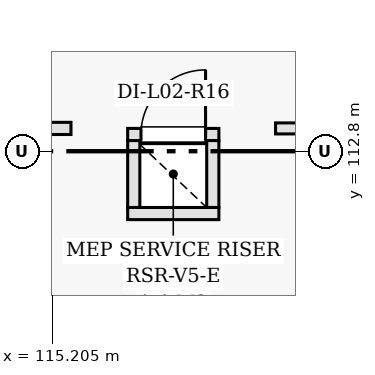
"""IFC4 building model, lengths in metres.
Left out: names, types, materials, properties, quantities, classifications, styles, units other than length and angle.
Written with IfcOpenShell. Run it as: python <this file> out.ifc"""

import sys

from ifc_helpers import new_model, si_unit, direction, frame, frame_2d, origin, place, context, subcontext, project, spatial, rectangle, extrude, element, fill, save


model = new_model("IFC4")
c1 = context("Model", 3, precision=1e-05, world=origin(), true_north=direction((0.0, 1.0)))
c2 = subcontext(c1, "Body", "Model", "MODEL_VIEW")
j1 = project(units=[si_unit("LENGTHUNIT", "METRE"), si_unit("PLANEANGLEUNIT", "RADIAN")], contexts=[c1])
p1 = place(None, origin())
s1 = spatial("IfcSite", under=j1, at=p1, CompositionType="ELEMENT")
p2 = place(p1, origin())
s2 = spatial("IfcBuilding", under=s1, at=p2, CompositionType="ELEMENT")
p3 = place(p2, frame((0.0, 0.0, 9.6)))
s3 = spatial("IfcBuildingStorey", under=s2, at=p3, CompositionType="ELEMENT", Elevation=9.6)
p4 = place(p3, frame((116.2, 111.98, 0.0), z_axis=(0.0, 0.0, 1.0), x_axis=(1.0, 0.0, 0.0)))
e1 = element("IfcWall", 1, at=p4, inside=s3, PredefinedType="PARTITIONING", context=c2, shape_type="SweptSolid", body=[
    extrude(rectangle(XDim=1.2, YDim=0.16, at=frame_2d((0.6, 0.0))), origin(), (0.0, 0.0, 1.0), 3.94),
])
p5 = place(p3, frame((116.2, 113.02, 0.0), z_axis=(0.0, 0.0, 1.0), x_axis=(1.0, 0.0, 0.0)))
e2 = element("IfcWall", 2, at=p5, inside=s3, PredefinedType="PARTITIONING", context=c2, shape_type="SweptSolid", body=[
    extrude(rectangle(XDim=1.2, YDim=0.16, at=frame_2d((0.6, 0.0))), origin(), (0.0, 0.0, 1.0), 3.94),
])
p6 = place(p5, frame((0.175, 0.0, 0.0)))
e3 = element("IfcOpeningElement", 3, at=p6, cuts=e2, PredefinedType="OPENING", context=c2, shape_type="SweptSolid", body=[
    extrude(rectangle(XDim=0.85, YDim=2.02, at=frame_2d((0.425, 1.01))), frame((0.0, 0.09, 0.0), z_axis=(0.0, -1.0, 0.0), x_axis=(1.0, 0.0, 0.0)), (0.0, 0.0, 1.0), 0.18),
])
for number, where, z_axis, x_axis in (
    (4, (116.28, 112.06, 0.0), (0.0, 0.0, 1.0), (0.0, 1.0, 0.0)),
    (5, (117.32, 112.06, 0.0), (0.0, 0.0, 1.0), (0.0, 1.0, 0.0)),
):
    element("IfcWall", number, at=place(p3, frame(where, z_axis=z_axis, x_axis=x_axis)), inside=s3, PredefinedType="PARTITIONING", context=c2, shape_type="SweptSolid", body=[
        extrude(rectangle(XDim=0.88, YDim=0.16, at=frame_2d((0.44, 0.0))), origin(), (0.0, 0.0, 1.0), 3.94),
    ])
p7 = place(p3, frame((102.487, 113.1, 0.0), z_axis=(0.0, 0.0, 1.0), x_axis=(1.0, 0.0, 0.0)))
e6 = element("IfcWall", 6, at=p7, inside=s3, PredefinedType="PARTITIONING", context=c2, shape_type="SweptSolid", body=[
    extrude(rectangle(XDim=12.967, YDim=0.16, at=frame_2d((6.483, 0.0))), origin(), (0.0, 0.0, 1.0), 3.025),
])
p8 = place(p7, frame((5.583, 0.0, 0.0)))
e7 = element("IfcOpeningElement", 7, at=p8, cuts=e6, PredefinedType="OPENING", context=c2, shape_type="SweptSolid", body=[
    extrude(rectangle(XDim=1.8, YDim=2.2, at=frame_2d((0.9, 1.1))), frame((0.0, 0.09, 0.0), z_axis=(0.0, -1.0, 0.0), x_axis=(1.0, 0.0, 0.0)), (0.0, 0.0, 1.0), 0.18),
])
p9 = place(p3, frame((118.146, 113.1, 0.0), z_axis=(0.0, 0.0, 1.0), x_axis=(1.0, 0.0, 0.0)))
e8 = element("IfcWall", 8, at=p9, inside=s3, PredefinedType="PARTITIONING", context=c2, shape_type="SweptSolid", body=[
    extrude(rectangle(XDim=7.854, YDim=0.145, at=frame_2d((3.927, 0.0))), origin(), (0.0, 0.0, 1.0), 3.175),
])
p10 = place(p6, origin())
e9 = element("IfcDoor", 9, at=p10, inside=s3, OperationType="SINGLE_SWING_RIGHT", PredefinedType="DOOR", context=c2, shape_type="SweptSolid", body=[
    extrude(rectangle(XDim=0.85, YDim=2.02, at=frame_2d((0.425, 1.01))), frame((0.0, 0.025, 0.0), z_axis=(0.0, -1.0, 0.0), x_axis=(1.0, 0.0, 0.0)), (0.0, 0.0, 1.0), 0.05),
])
fill(e3, e9)
save(model, sys.argv[1])
